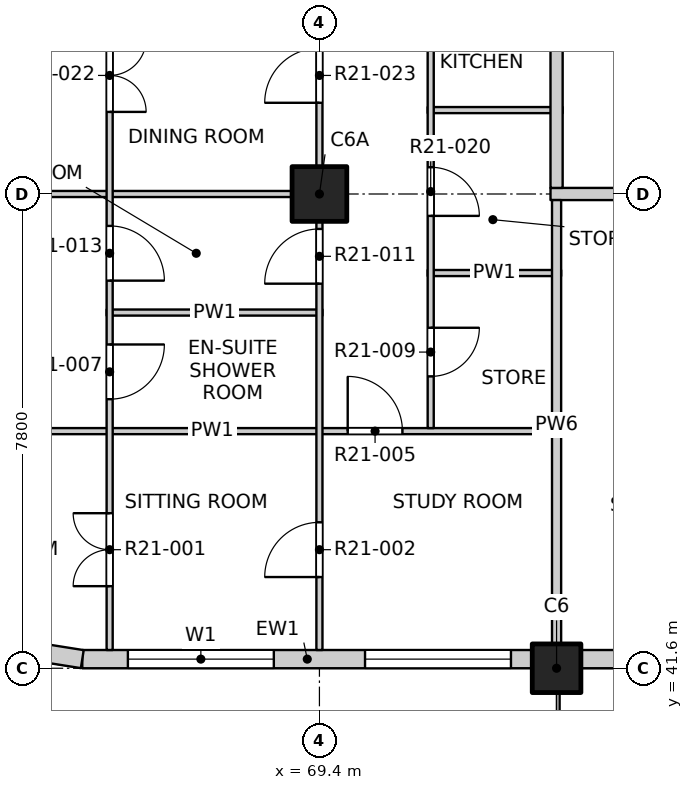
"""IFC4 building model, lengths in metres.
Left out: names, types, materials, properties, quantities, classifications, styles, units other than length and angle.
Written with IfcOpenShell. Run it as: python <this file> out.ifc"""

import sys

from ifc_helpers import new_model, si_unit, direction, frame, frame_2d, origin, origin_2d, place, context, subcontext, project, spatial, rectangle, extrude, element, fill, save


model = new_model("IFC4")
c1 = context("Model", 3, precision=1e-05, world=origin(), true_north=direction((0.0, 1.0)))
c2 = subcontext(c1, "Body", "Model", "MODEL_VIEW")
j1 = project(units=[si_unit("LENGTHUNIT", "METRE"), si_unit("PLANEANGLEUNIT", "RADIAN")], contexts=[c1])
p1 = place(None, origin())
s1 = spatial("IfcSite", under=j1, at=p1, CompositionType="ELEMENT")
p2 = place(p1, origin())
s2 = spatial("IfcBuilding", under=s1, at=p2, CompositionType="ELEMENT")
p3 = place(p2, frame((0.0, 0.0, 214.3)))
s3 = spatial("IfcBuildingStorey", under=s2, at=p3, CompositionType="ELEMENT", Elevation=214.3)
p4 = place(p3, frame((73.3, 41.6, -0.25), z_axis=(0.0, 0.0, 1.0), x_axis=(1.0, 0.0, 0.0)))
e1 = element("IfcColumn", 1, at=p4, inside=s3, PredefinedType="COLUMN", context=c2, shape_type="SweptSolid", body=[
    extrude(rectangle(XDim=0.8, YDim=0.8, at=origin_2d()), origin(), (0.0, 0.0, 1.0), 3.4),
])
p5 = place(p3, frame((69.4, 49.4, -0.25), z_axis=(0.0, 0.0, 1.0), x_axis=(1.0, 0.0, 0.0)))
e2 = element("IfcColumn", 2, at=p5, inside=s3, PredefinedType="COLUMN", context=c2, shape_type="SweptSolid", body=[
    extrude(rectangle(XDim=0.9, YDim=0.9, at=origin_2d()), origin(), (0.0, 0.0, 1.0), 3.4),
])
p6 = place(p3, frame((65.5, 41.75, 0.0), z_axis=(0.0, 0.0, 1.0), x_axis=(1.0, 0.0, 0.0)))
e3 = element("IfcWall", 3, at=p6, inside=s3, PredefinedType="SOLIDWALL", context=c2, shape_type="SweptSolid", body=[
    extrude(rectangle(XDim=7.4, YDim=0.3, at=frame_2d((3.7, 0.0))), origin(), (0.0, 0.0, 1.0), 2.7),
])
p7 = place(p6, frame((0.75, 0.0, 0.9)))
e4 = element("IfcOpeningElement", 4, at=p7, cuts=e3, PredefinedType="OPENING", context=c2, shape_type="SweptSolid", body=[
    extrude(rectangle(XDim=2.4, YDim=1.8, at=frame_2d((1.2, 0.9))), frame((0.0, 0.16, 0.0), z_axis=(0.0, -1.0, 0.0), x_axis=(1.0, 0.0, 0.0)), (0.0, 0.0, 1.0), 0.32),
])
p8 = place(p6, frame((4.65, 0.0, 0.9)))
e5 = element("IfcOpeningElement", 5, at=p8, cuts=e3, PredefinedType="OPENING", context=c2, shape_type="SweptSolid", body=[
    extrude(rectangle(XDim=2.4, YDim=1.8, at=frame_2d((1.2, 0.9))), frame((0.0, 0.16, 0.0), z_axis=(0.0, -1.0, 0.0), x_axis=(1.0, 0.0, 0.0)), (0.0, 0.0, 1.0), 0.32),
])
p9 = place(p3, frame((73.7, 41.75, 0.0), z_axis=(0.0, 0.0, 1.0), x_axis=(1.0, 0.0, 0.0)))
e6 = element("IfcWall", 6, at=p9, inside=s3, PredefinedType="SOLIDWALL", context=c2, shape_type="SweptSolid", body=[
    extrude(rectangle(XDim=7.0, YDim=0.3, at=frame_2d((3.5, 0.0))), origin(), (0.0, 0.0, 1.0), 2.7),
])
p10 = place(p9, frame((0.65, 0.0, 0.0)))
e7 = element("IfcOpeningElement", 7, at=p10, cuts=e6, PredefinedType="OPENING", context=c2, shape_type="SweptSolid", body=[
    extrude(rectangle(XDim=1.8, YDim=2.4, at=frame_2d((0.9, 1.2))), frame((0.0, 0.16, 0.0), z_axis=(0.0, -1.0, 0.0), x_axis=(1.0, 0.0, 0.0)), (0.0, 0.0, 1.0), 0.32),
])
p11 = place(p9, frame((4.25, 0.0, 0.9)))
e8 = element("IfcOpeningElement", 8, at=p11, cuts=e6, PredefinedType="OPENING", context=c2, shape_type="SweptSolid", body=[
    extrude(rectangle(XDim=2.4, YDim=1.8, at=frame_2d((1.2, 0.9))), frame((0.0, 0.16, 0.0), z_axis=(0.0, -1.0, 0.0), x_axis=(1.0, 0.0, 0.0)), (0.0, 0.0, 1.0), 0.32),
])
p12 = place(p3, frame((64.341, 41.934, 0.0), z_axis=(0.0, 0.0, 1.0), x_axis=(0.987678452879, -0.156496880861, 0.0)))
e9 = element("IfcWall", 9, at=p12, inside=s3, PredefinedType="SOLIDWALL", context=c2, shape_type="SweptSolid", body=[
    extrude(rectangle(XDim=1.173, YDim=0.3, at=frame_2d((0.586, 0.0))), origin(), (0.0, 0.0, 1.0), 2.7),
])
p13 = place(p3, frame((61.9, 45.5, 0.0), z_axis=(0.0, 0.0, 1.0), x_axis=(1.0, 0.0, 0.0)))
e10 = element("IfcWall", 10, at=p13, inside=s3, PredefinedType="PARTITIONING", context=c2, shape_type="SweptSolid", body=[
    extrude(rectangle(XDim=11.475, YDim=0.1, at=frame_2d((5.737, 0.0))), origin(), (0.0, 0.0, 1.0), 3.15),
])
p14 = place(p13, frame((7.965, 0.0, 0.0)))
e11 = element("IfcOpeningElement", 11, at=p14, cuts=e10, PredefinedType="OPENING", context=c2, shape_type="SweptSolid", body=[
    extrude(rectangle(XDim=0.9, YDim=2.1, at=frame_2d((0.45, 1.05))), frame((0.0, 0.06, 0.0), z_axis=(0.0, -1.0, 0.0), x_axis=(1.0, 0.0, 0.0)), (0.0, 0.0, 1.0), 0.12),
])
p15 = place(p3, frame((65.9, 47.45, 0.0), z_axis=(0.0, 0.0, 1.0), x_axis=(1.0, 0.0, 0.0)))
e12 = element("IfcWall", 12, at=p15, inside=s3, PredefinedType="PARTITIONING", context=c2, shape_type="SweptSolid", body=[
    extrude(rectangle(XDim=3.55, YDim=0.1, at=frame_2d((1.775, 0.0))), origin(), (0.0, 0.0, 1.0), 3.15),
])
p16 = place(p3, frame((71.18, 48.1, 0.0), z_axis=(0.0, 0.0, 1.0), x_axis=(1.0, 0.0, 0.0)))
e13 = element("IfcWall", 13, at=p16, inside=s3, PredefinedType="PARTITIONING", context=c2, shape_type="SweptSolid", body=[
    extrude(rectangle(XDim=2.195, YDim=0.1, at=frame_2d((1.097, 0.0))), origin(), (0.0, 0.0, 1.0), 3.15),
])
p17 = place(p3, frame((61.9, 49.4, 0.0), z_axis=(0.0, 0.0, 1.0), x_axis=(1.0, 0.0, 0.0)))
e14 = element("IfcWall", 14, at=p17, inside=s3, PredefinedType="PARTITIONING", context=c2, shape_type="SweptSolid", body=[
    extrude(rectangle(XDim=7.55, YDim=0.1, at=frame_2d((3.775, 0.0))), origin(), (0.0, 0.0, 1.0), 3.15),
])
p18 = place(p3, frame((73.2, 49.4, 0.0), z_axis=(0.0, 0.0, 1.0), x_axis=(1.0, 0.0, 0.0)))
e15 = element("IfcWall", 15, at=p18, inside=s3, PredefinedType="PARTITIONING", context=c2, shape_type="SweptSolid", body=[
    extrude(rectangle(XDim=23.6, YDim=0.2, at=frame_2d((11.8, 0.0))), origin(), (0.0, 0.0, 1.0), 3.15),
])
p19 = place(p18, frame((1.6, 0.0, 0.0)))
e16 = element("IfcOpeningElement", 16, at=p19, cuts=e15, PredefinedType="OPENING", context=c2, shape_type="SweptSolid", body=[
    extrude(rectangle(XDim=0.9, YDim=2.1, at=frame_2d((0.45, 1.05))), frame((0.0, 0.11, 0.0), z_axis=(0.0, -1.0, 0.0), x_axis=(1.0, 0.0, 0.0)), (0.0, 0.0, 1.0), 0.22),
])
p20 = place(p18, frame((7.3, 0.0, 0.0)))
e17 = element("IfcOpeningElement", 17, at=p20, cuts=e15, PredefinedType="OPENING", context=c2, shape_type="SweptSolid", body=[
    extrude(rectangle(XDim=1.2, YDim=2.1, at=frame_2d((0.6, 1.05))), frame((0.0, 0.11, 0.0), z_axis=(0.0, -1.0, 0.0), x_axis=(1.0, 0.0, 0.0)), (0.0, 0.0, 1.0), 0.22),
])
p21 = place(p18, frame((13.3, 0.0, 0.0)))
e18 = element("IfcOpeningElement", 18, at=p21, cuts=e15, PredefinedType="OPENING", context=c2, shape_type="SweptSolid", body=[
    extrude(rectangle(XDim=0.9, YDim=2.1, at=frame_2d((0.45, 1.05))), frame((0.0, 0.11, 0.0), z_axis=(0.0, -1.0, 0.0), x_axis=(1.0, 0.0, 0.0)), (0.0, 0.0, 1.0), 0.22),
])
p22 = place(p18, frame((20.175, 0.0, 0.0)))
e19 = element("IfcOpeningElement", 19, at=p22, cuts=e15, PredefinedType="OPENING", context=c2, shape_type="SweptSolid", body=[
    extrude(rectangle(XDim=1.2, YDim=2.1, at=frame_2d((0.6, 1.05))), frame((0.0, 0.11, 0.0), z_axis=(0.0, -1.0, 0.0), x_axis=(1.0, 0.0, 0.0)), (0.0, 0.0, 1.0), 0.22),
])
p23 = place(p3, frame((71.18, 50.78, 0.0), z_axis=(0.0, 0.0, 1.0), x_axis=(1.0, 0.0, 0.0)))
e20 = element("IfcWall", 20, at=p23, inside=s3, PredefinedType="PARTITIONING", context=c2, shape_type="SweptSolid", body=[
    extrude(rectangle(XDim=2.22, YDim=0.1, at=frame_2d((1.11, 0.0))), origin(), (0.0, 0.0, 1.0), 3.15),
])
p24 = place(p3, frame((65.95, 41.9, 0.0), z_axis=(0.0, 0.0, 1.0), x_axis=(0.0, 1.0, 0.0)))
e21 = element("IfcWall", 21, at=p24, inside=s3, PredefinedType="PARTITIONING", context=c2, shape_type="SweptSolid", body=[
    extrude(rectangle(XDim=19.1, YDim=0.1, at=frame_2d((9.55, 0.0))), origin(), (0.0, 0.0, 1.0), 3.15),
])
p25 = place(p24, frame((1.05, 0.0, 0.0)))
e22 = element("IfcOpeningElement", 22, at=p25, cuts=e21, PredefinedType="OPENING", context=c2, shape_type="SweptSolid", body=[
    extrude(rectangle(XDim=1.2, YDim=2.1, at=frame_2d((0.6, 1.05))), frame((0.0, 0.06, 0.0), z_axis=(0.0, -1.0, 0.0), x_axis=(1.0, 0.0, 0.0)), (0.0, 0.0, 1.0), 0.12),
])
p26 = place(p24, frame((4.125, 0.0, 0.0)))
e23 = element("IfcOpeningElement", 23, at=p26, cuts=e21, PredefinedType="OPENING", context=c2, shape_type="SweptSolid", body=[
    extrude(rectangle(XDim=0.9, YDim=2.1, at=frame_2d((0.45, 1.05))), frame((0.0, 0.06, 0.0), z_axis=(0.0, -1.0, 0.0), x_axis=(1.0, 0.0, 0.0)), (0.0, 0.0, 1.0), 0.12),
])
p27 = place(p24, frame((6.075, 0.0, 0.0)))
e24 = element("IfcOpeningElement", 24, at=p27, cuts=e21, PredefinedType="OPENING", context=c2, shape_type="SweptSolid", body=[
    extrude(rectangle(XDim=0.9, YDim=2.1, at=frame_2d((0.45, 1.05))), frame((0.0, 0.06, 0.0), z_axis=(0.0, -1.0, 0.0), x_axis=(1.0, 0.0, 0.0)), (0.0, 0.0, 1.0), 0.12),
])
p28 = place(p24, frame((8.85, 0.0, 0.0)))
e25 = element("IfcOpeningElement", 25, at=p28, cuts=e21, PredefinedType="OPENING", context=c2, shape_type="SweptSolid", body=[
    extrude(rectangle(XDim=1.2, YDim=2.1, at=frame_2d((0.6, 1.05))), frame((0.0, 0.06, 0.0), z_axis=(0.0, -1.0, 0.0), x_axis=(1.0, 0.0, 0.0)), (0.0, 0.0, 1.0), 0.12),
])
p29 = place(p24, frame((12.75, 0.0, 0.0)))
e26 = element("IfcOpeningElement", 26, at=p29, cuts=e21, PredefinedType="OPENING", context=c2, shape_type="SweptSolid", body=[
    extrude(rectangle(XDim=1.2, YDim=2.1, at=frame_2d((0.6, 1.05))), frame((0.0, 0.06, 0.0), z_axis=(0.0, -1.0, 0.0), x_axis=(1.0, 0.0, 0.0)), (0.0, 0.0, 1.0), 0.12),
])
p30 = place(p24, frame((15.825, 0.0, 0.0)))
e27 = element("IfcOpeningElement", 27, at=p30, cuts=e21, PredefinedType="OPENING", context=c2, shape_type="SweptSolid", body=[
    extrude(rectangle(XDim=0.9, YDim=2.1, at=frame_2d((0.45, 1.05))), frame((0.0, 0.06, 0.0), z_axis=(0.0, -1.0, 0.0), x_axis=(1.0, 0.0, 0.0)), (0.0, 0.0, 1.0), 0.12),
])
p31 = place(p24, frame((17.775, 0.0, 0.0)))
e28 = element("IfcOpeningElement", 28, at=p31, cuts=e21, PredefinedType="OPENING", context=c2, shape_type="SweptSolid", body=[
    extrude(rectangle(XDim=0.9, YDim=2.1, at=frame_2d((0.45, 1.05))), frame((0.0, 0.06, 0.0), z_axis=(0.0, -1.0, 0.0), x_axis=(1.0, 0.0, 0.0)), (0.0, 0.0, 1.0), 0.12),
])
p32 = place(p3, frame((69.4, 41.9, 0.0), z_axis=(0.0, 0.0, 1.0), x_axis=(0.0, 1.0, 0.0)))
e29 = element("IfcWall", 29, at=p32, inside=s3, PredefinedType="PARTITIONING", context=c2, shape_type="SweptSolid", body=[
    extrude(rectangle(XDim=46.2, YDim=0.1, at=frame_2d((23.1, 0.0))), origin(), (0.0, 0.0, 1.0), 3.15),
])
p33 = place(p32, frame((1.2, 0.0, 0.0)))
e30 = element("IfcOpeningElement", 30, at=p33, cuts=e29, PredefinedType="OPENING", context=c2, shape_type="SweptSolid", body=[
    extrude(rectangle(XDim=0.9, YDim=2.1, at=frame_2d((0.45, 1.05))), frame((0.0, 0.06, 0.0), z_axis=(0.0, -1.0, 0.0), x_axis=(1.0, 0.0, 0.0)), (0.0, 0.0, 1.0), 0.12),
])
p34 = place(p32, frame((6.025, 0.0, 0.0)))
e31 = element("IfcOpeningElement", 31, at=p34, cuts=e29, PredefinedType="OPENING", context=c2, shape_type="SweptSolid", body=[
    extrude(rectangle(XDim=0.9, YDim=2.1, at=frame_2d((0.45, 1.05))), frame((0.0, 0.06, 0.0), z_axis=(0.0, -1.0, 0.0), x_axis=(1.0, 0.0, 0.0)), (0.0, 0.0, 1.0), 0.12),
])
p35 = place(p32, frame((9.0, 0.0, 0.0)))
e32 = element("IfcOpeningElement", 32, at=p35, cuts=e29, PredefinedType="OPENING", context=c2, shape_type="SweptSolid", body=[
    extrude(rectangle(XDim=0.9, YDim=2.1, at=frame_2d((0.45, 1.05))), frame((0.0, 0.06, 0.0), z_axis=(0.0, -1.0, 0.0), x_axis=(1.0, 0.0, 0.0)), (0.0, 0.0, 1.0), 0.12),
])
p36 = place(p32, frame((12.9, 0.0, 0.0)))
e33 = element("IfcOpeningElement", 33, at=p36, cuts=e29, PredefinedType="OPENING", context=c2, shape_type="SweptSolid", body=[
    extrude(rectangle(XDim=0.9, YDim=2.1, at=frame_2d((0.45, 1.05))), frame((0.0, 0.06, 0.0), z_axis=(0.0, -1.0, 0.0), x_axis=(1.0, 0.0, 0.0)), (0.0, 0.0, 1.0), 0.12),
])
p37 = place(p32, frame((17.775, 0.0, 0.0)))
e34 = element("IfcOpeningElement", 34, at=p37, cuts=e29, PredefinedType="OPENING", context=c2, shape_type="SweptSolid", body=[
    extrude(rectangle(XDim=0.9, YDim=2.1, at=frame_2d((0.45, 1.05))), frame((0.0, 0.06, 0.0), z_axis=(0.0, -1.0, 0.0), x_axis=(1.0, 0.0, 0.0)), (0.0, 0.0, 1.0), 0.12),
])
p38 = place(p32, frame((20.7, 0.0, 0.0)))
e35 = element("IfcOpeningElement", 35, at=p38, cuts=e29, PredefinedType="OPENING", context=c2, shape_type="SweptSolid", body=[
    extrude(rectangle(XDim=0.9, YDim=2.1, at=frame_2d((0.45, 1.05))), frame((0.0, 0.06, 0.0), z_axis=(0.0, -1.0, 0.0), x_axis=(1.0, 0.0, 0.0)), (0.0, 0.0, 1.0), 0.12),
])
p39 = place(p32, frame((24.6, 0.0, 0.0)))
e36 = element("IfcOpeningElement", 36, at=p39, cuts=e29, PredefinedType="OPENING", context=c2, shape_type="SweptSolid", body=[
    extrude(rectangle(XDim=0.9, YDim=2.1, at=frame_2d((0.45, 1.05))), frame((0.0, 0.06, 0.0), z_axis=(0.0, -1.0, 0.0), x_axis=(1.0, 0.0, 0.0)), (0.0, 0.0, 1.0), 0.12),
])
p40 = place(p32, frame((29.425, 0.0, 0.0)))
e37 = element("IfcOpeningElement", 37, at=p40, cuts=e29, PredefinedType="OPENING", context=c2, shape_type="SweptSolid", body=[
    extrude(rectangle(XDim=0.9, YDim=2.1, at=frame_2d((0.45, 1.05))), frame((0.0, 0.06, 0.0), z_axis=(0.0, -1.0, 0.0), x_axis=(1.0, 0.0, 0.0)), (0.0, 0.0, 1.0), 0.12),
])
p41 = place(p32, frame((33.375, 0.0, 0.0)))
e38 = element("IfcOpeningElement", 38, at=p41, cuts=e29, PredefinedType="OPENING", context=c2, shape_type="SweptSolid", body=[
    extrude(rectangle(XDim=0.9, YDim=2.1, at=frame_2d((0.45, 1.05))), frame((0.0, 0.06, 0.0), z_axis=(0.0, -1.0, 0.0), x_axis=(1.0, 0.0, 0.0)), (0.0, 0.0, 1.0), 0.12),
])
p42 = place(p32, frame((36.3, 0.0, 0.0)))
e39 = element("IfcOpeningElement", 39, at=p42, cuts=e29, PredefinedType="OPENING", context=c2, shape_type="SweptSolid", body=[
    extrude(rectangle(XDim=0.9, YDim=2.1, at=frame_2d((0.45, 1.05))), frame((0.0, 0.06, 0.0), z_axis=(0.0, -1.0, 0.0), x_axis=(1.0, 0.0, 0.0)), (0.0, 0.0, 1.0), 0.12),
])
p43 = place(p32, frame((41.175, 0.0, 0.0)))
e40 = element("IfcOpeningElement", 40, at=p43, cuts=e29, PredefinedType="OPENING", context=c2, shape_type="SweptSolid", body=[
    extrude(rectangle(XDim=0.9, YDim=2.1, at=frame_2d((0.45, 1.05))), frame((0.0, 0.06, 0.0), z_axis=(0.0, -1.0, 0.0), x_axis=(1.0, 0.0, 0.0)), (0.0, 0.0, 1.0), 0.12),
])
p44 = place(p32, frame((44.1, 0.0, 0.0)))
e41 = element("IfcOpeningElement", 41, at=p44, cuts=e29, PredefinedType="OPENING", context=c2, shape_type="SweptSolid", body=[
    extrude(rectangle(XDim=0.9, YDim=2.1, at=frame_2d((0.45, 1.05))), frame((0.0, 0.06, 0.0), z_axis=(0.0, -1.0, 0.0), x_axis=(1.0, 0.0, 0.0)), (0.0, 0.0, 1.0), 0.12),
])
p45 = place(p3, frame((71.23, 45.55, 0.0), z_axis=(0.0, 0.0, 1.0), x_axis=(0.0, 1.0, 0.0)))
e42 = element("IfcWall", 42, at=p45, inside=s3, PredefinedType="PARTITIONING", context=c2, shape_type="SweptSolid", body=[
    extrude(rectangle(XDim=8.4, YDim=0.1, at=frame_2d((4.2, 0.0))), origin(), (0.0, 0.0, 1.0), 3.15),
])
p46 = place(p45, frame((0.85, 0.0, 0.0)))
e43 = element("IfcOpeningElement", 43, at=p46, cuts=e42, PredefinedType="OPENING", context=c2, shape_type="SweptSolid", body=[
    extrude(rectangle(XDim=0.8, YDim=2.1, at=frame_2d((0.4, 1.05))), frame((0.0, 0.06, 0.0), z_axis=(0.0, -1.0, 0.0), x_axis=(1.0, 0.0, 0.0)), (0.0, 0.0, 1.0), 0.12),
])
p47 = place(p45, frame((3.49, 0.0, 0.0)))
e44 = element("IfcOpeningElement", 44, at=p47, cuts=e42, PredefinedType="OPENING", context=c2, shape_type="SweptSolid", body=[
    extrude(rectangle(XDim=0.8, YDim=2.1, at=frame_2d((0.4, 1.05))), frame((0.0, 0.06, 0.0), z_axis=(0.0, -1.0, 0.0), x_axis=(1.0, 0.0, 0.0)), (0.0, 0.0, 1.0), 0.12),
])
p48 = place(p45, frame((6.39, 0.0, 0.0)))
e45 = element("IfcOpeningElement", 45, at=p48, cuts=e42, PredefinedType="OPENING", context=c2, shape_type="SweptSolid", body=[
    extrude(rectangle(XDim=0.9, YDim=2.1, at=frame_2d((0.45, 1.05))), frame((0.0, 0.06, 0.0), z_axis=(0.0, -1.0, 0.0), x_axis=(1.0, 0.0, 0.0)), (0.0, 0.0, 1.0), 0.12),
])
p49 = place(p3, frame((73.3, 41.9, 0.0), z_axis=(0.0, 0.0, 1.0), x_axis=(0.0, 1.0, 0.0)))
e46 = element("IfcWall", 46, at=p49, inside=s3, PredefinedType="PARTITIONING", context=c2, shape_type="SweptSolid", body=[
    extrude(rectangle(XDim=7.4, YDim=0.15, at=frame_2d((3.7, 0.0))), origin(), (0.0, 0.0, 1.0), 3.15),
])
p50 = place(p3, frame((73.3, 49.5, 0.0), z_axis=(0.0, 0.0, 1.0), x_axis=(0.0, 1.0, 0.0)))
e47 = element("IfcWall", 47, at=p50, inside=s3, PredefinedType="PARTITIONING", context=c2, shape_type="SweptSolid", body=[
    extrude(rectangle(XDim=34.9, YDim=0.2, at=frame_2d((17.45, 0.0))), origin(), (0.0, 0.0, 1.0), 3.15),
])
p51 = place(p50, frame((3.325, 0.0, 0.0)))
e48 = element("IfcOpeningElement", 48, at=p51, cuts=e47, PredefinedType="OPENING", context=c2, shape_type="SweptSolid", body=[
    extrude(rectangle(XDim=1.0, YDim=2.1, at=frame_2d((0.5, 1.05))), frame((0.0, 0.11, 0.0), z_axis=(0.0, -1.0, 0.0), x_axis=(1.0, 0.0, 0.0)), (0.0, 0.0, 1.0), 0.22),
])
p52 = place(p50, frame((18.875, 0.0, 0.0)))
e49 = element("IfcOpeningElement", 49, at=p52, cuts=e47, PredefinedType="OPENING", context=c2, shape_type="SweptSolid", body=[
    extrude(rectangle(XDim=1.0, YDim=2.1, at=frame_2d((0.5, 1.05))), frame((0.0, 0.11, 0.0), z_axis=(0.0, -1.0, 0.0), x_axis=(1.0, 0.0, 0.0)), (0.0, 0.0, 1.0), 0.22),
])
p53 = place(p50, frame((29.325, 0.0, 0.0)))
e50 = element("IfcOpeningElement", 50, at=p53, cuts=e47, PredefinedType="OPENING", context=c2, shape_type="SweptSolid", body=[
    extrude(rectangle(XDim=1.0, YDim=2.1, at=frame_2d((0.5, 1.05))), frame((0.0, 0.11, 0.0), z_axis=(0.0, -1.0, 0.0), x_axis=(1.0, 0.0, 0.0)), (0.0, 0.0, 1.0), 0.22),
])
p54 = place(p7, origin())
e51 = element("IfcWindow", 51, at=p54, inside=s3, PartitioningType="DOUBLE_PANEL_VERTICAL", PredefinedType="WINDOW", context=c2, shape_type="SweptSolid", body=[
    extrude(rectangle(XDim=2.4, YDim=1.8, at=frame_2d((1.2, 0.9))), frame((0.0, 0.03, 0.0), z_axis=(0.0, -1.0, 0.0), x_axis=(1.0, 0.0, 0.0)), (0.0, 0.0, 1.0), 0.06),
])
fill(e4, e51)
p55 = place(p8, origin())
e52 = element("IfcWindow", 52, at=p55, inside=s3, PartitioningType="DOUBLE_PANEL_VERTICAL", PredefinedType="WINDOW", context=c2, shape_type="SweptSolid", body=[
    extrude(rectangle(XDim=2.4, YDim=1.8, at=frame_2d((1.2, 0.9))), frame((0.0, 0.03, 0.0), z_axis=(0.0, -1.0, 0.0), x_axis=(1.0, 0.0, 0.0)), (0.0, 0.0, 1.0), 0.06),
])
fill(e5, e52)
p56 = place(p25, origin())
e53 = element("IfcDoor", 53, at=p56, inside=s3, OperationType="DOUBLE_DOOR_SINGLE_SWING", PredefinedType="DOOR", context=c2, shape_type="SweptSolid", body=[
    extrude(rectangle(XDim=1.2, YDim=2.1, at=frame_2d((0.6, 1.05))), frame((0.0, 0.025, 0.0), z_axis=(0.0, -1.0, 0.0), x_axis=(1.0, 0.0, 0.0)), (0.0, 0.0, 1.0), 0.05),
])
fill(e22, e53)
p57 = place(p33, origin())
e54 = element("IfcDoor", 54, at=p57, inside=s3, OperationType="SINGLE_SWING_LEFT", PredefinedType="DOOR", context=c2, shape_type="SweptSolid", body=[
    extrude(rectangle(XDim=0.9, YDim=2.1, at=frame_2d((0.45, 1.05))), frame((0.0, 0.025, 0.0), z_axis=(0.0, -1.0, 0.0), x_axis=(1.0, 0.0, 0.0)), (0.0, 0.0, 1.0), 0.05),
])
fill(e30, e54)
p58 = place(p14, origin())
e55 = element("IfcDoor", 55, at=p58, inside=s3, OperationType="SINGLE_SWING_LEFT", PredefinedType="DOOR", context=c2, shape_type="SweptSolid", body=[
    extrude(rectangle(XDim=0.9, YDim=2.1, at=frame_2d((0.45, 1.05))), frame((0.0, 0.025, 0.0), z_axis=(0.0, -1.0, 0.0), x_axis=(1.0, 0.0, 0.0)), (0.0, 0.0, 1.0), 0.05),
])
fill(e11, e55)
p59 = place(p26, origin())
e56 = element("IfcDoor", 56, at=p59, inside=s3, OperationType="SINGLE_SWING_LEFT", PredefinedType="DOOR", context=c2, shape_type="SweptSolid", body=[
    extrude(rectangle(XDim=0.9, YDim=2.1, at=frame_2d((0.45, 1.05))), frame((0.0, 0.025, 0.0), z_axis=(0.0, -1.0, 0.0), x_axis=(1.0, 0.0, 0.0)), (0.0, 0.0, 1.0), 0.05),
])
fill(e23, e56)
p60 = place(p46, origin())
e57 = element("IfcDoor", 57, at=p60, inside=s3, OperationType="SINGLE_SWING_LEFT", PredefinedType="DOOR", context=c2, shape_type="SweptSolid", body=[
    extrude(rectangle(XDim=0.8, YDim=2.1, at=frame_2d((0.4, 1.05))), frame((0.0, 0.025, 0.0), z_axis=(0.0, -1.0, 0.0), x_axis=(1.0, 0.0, 0.0)), (0.0, 0.0, 1.0), 0.05),
])
fill(e43, e57)
p61 = place(p34, origin())
e58 = element("IfcDoor", 58, at=p61, inside=s3, OperationType="SINGLE_SWING_LEFT", PredefinedType="DOOR", context=c2, shape_type="SweptSolid", body=[
    extrude(rectangle(XDim=0.9, YDim=2.1, at=frame_2d((0.45, 1.05))), frame((0.0, 0.025, 0.0), z_axis=(0.0, -1.0, 0.0), x_axis=(1.0, 0.0, 0.0)), (0.0, 0.0, 1.0), 0.05),
])
fill(e31, e58)
p62 = place(p27, origin())
e59 = element("IfcDoor", 59, at=p62, inside=s3, OperationType="SINGLE_SWING_RIGHT", PredefinedType="DOOR", context=c2, shape_type="SweptSolid", body=[
    extrude(rectangle(XDim=0.9, YDim=2.1, at=frame_2d((0.45, 1.05))), frame((0.0, 0.025, 0.0), z_axis=(0.0, -1.0, 0.0), x_axis=(1.0, 0.0, 0.0)), (0.0, 0.0, 1.0), 0.05),
])
fill(e24, e59)
p63 = place(p47, origin())
e60 = element("IfcDoor", 60, at=p63, inside=s3, OperationType="SINGLE_SWING_RIGHT", PredefinedType="DOOR", context=c2, shape_type="SweptSolid", body=[
    extrude(rectangle(XDim=0.8, YDim=2.1, at=frame_2d((0.4, 1.05))), frame((0.0, 0.025, 0.0), z_axis=(0.0, -1.0, 0.0), x_axis=(1.0, 0.0, 0.0)), (0.0, 0.0, 1.0), 0.05),
])
fill(e44, e60)
p64 = place(p28, origin())
e61 = element("IfcDoor", 61, at=p64, inside=s3, OperationType="DOUBLE_DOOR_SINGLE_SWING", PredefinedType="DOOR", context=c2, shape_type="SweptSolid", body=[
    extrude(rectangle(XDim=1.2, YDim=2.1, at=frame_2d((0.6, 1.05))), frame((0.0, 0.025, 0.0), z_axis=(0.0, -1.0, 0.0), x_axis=(1.0, 0.0, 0.0)), (0.0, 0.0, 1.0), 0.05),
])
fill(e25, e61)
p65 = place(p35, origin())
e62 = element("IfcDoor", 62, at=p65, inside=s3, OperationType="SINGLE_SWING_LEFT", PredefinedType="DOOR", context=c2, shape_type="SweptSolid", body=[
    extrude(rectangle(XDim=0.9, YDim=2.1, at=frame_2d((0.45, 1.05))), frame((0.0, 0.025, 0.0), z_axis=(0.0, -1.0, 0.0), x_axis=(1.0, 0.0, 0.0)), (0.0, 0.0, 1.0), 0.05),
])
fill(e32, e62)
save(model, sys.argv[1])
